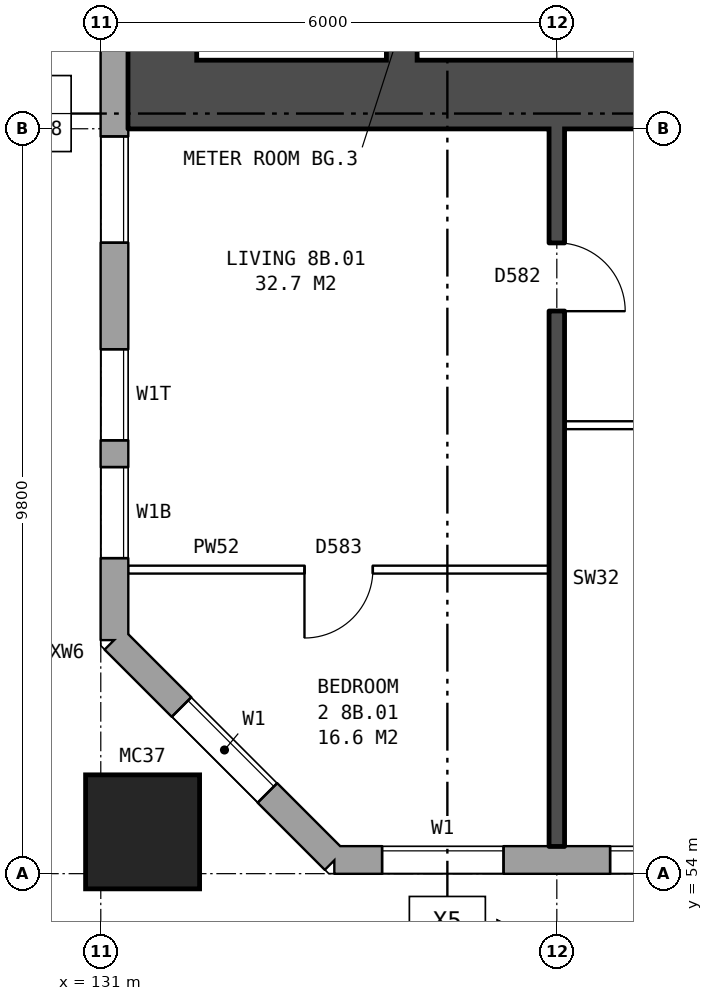
"""IFC4 building model, lengths in metres.
Left out: names, types, materials, properties, quantities, classifications, styles, units other than length and angle.
Written with IfcOpenShell. Run it as: python <this file> out.ifc"""

import sys

from ifc_helpers import new_model, si_unit, direction, frame, frame_2d, origin, origin_2d, place, context, subcontext, project, spatial, rectangle, hollow_rectangle, extrude, element, fill, save


model = new_model("IFC4")
c1 = context("Model", 3, precision=1e-05, world=origin(), true_north=direction((0.0, 1.0)))
c2 = subcontext(c1, "Body", "Model", "MODEL_VIEW")
j1 = project(units=[si_unit("LENGTHUNIT", "METRE"), si_unit("PLANEANGLEUNIT", "RADIAN")], contexts=[c1])
p1 = place(None, origin())
s1 = spatial("IfcSite", under=j1, at=p1, CompositionType="ELEMENT")
p2 = place(p1, origin())
s2 = spatial("IfcBuilding", under=s1, at=p2, CompositionType="ELEMENT")
p3 = place(p2, frame((0.0, 0.0, 31.9)))
s3 = spatial("IfcBuildingStorey", under=s2, at=p3, CompositionType="ELEMENT", Elevation=31.9)
p4 = place(p3, frame((131.55, 54.55, 0.0), z_axis=(0.0, 0.0, 1.0), x_axis=(1.0, 0.0, 0.0)))
e1 = element("IfcColumn", 1, at=p4, inside=s3, PredefinedType="COLUMN", context=c2, shape_type="SweptSolid", body=[
    extrude(hollow_rectangle(XDim=1.5, YDim=1.5, WallThickness=0.08, at=origin_2d()), origin(), (0.0, 0.0, 1.0), 3.1),
])
p5 = place(p3, frame((131.18, 57.075, 0.0), z_axis=(0.0, 0.0, 1.0), x_axis=(0.707106781187, -0.707106781187, 0.0)))
e2 = element("IfcWall", 2, at=p5, inside=s3, PredefinedType="STANDARD", context=c2, shape_type="SweptSolid", body=[
    extrude(rectangle(XDim=4.094, YDim=0.36, at=frame_2d((2.047, 0.0))), origin(), (0.0, 0.0, 1.0), 2.85),
])
p6 = place(p5, frame((1.247, 0.0, 0.8)))
e3 = element("IfcOpeningElement", 3, at=p6, cuts=e2, PredefinedType="OPENING", context=c2, shape_type="SweptSolid", body=[
    extrude(rectangle(XDim=1.6, YDim=1.8, at=frame_2d((0.8, 0.9))), frame((0.0, 0.19, 0.0), z_axis=(0.0, -1.0, 0.0), x_axis=(1.0, 0.0, 0.0)), (0.0, 0.0, 1.0), 0.38),
])
p7 = place(p3, frame((134.075, 54.18, 0.0), z_axis=(0.0, 0.0, 1.0), x_axis=(1.0, 0.0, 0.0)))
e4 = element("IfcWall", 4, at=p7, inside=s3, PredefinedType="STANDARD", context=c2, shape_type="SweptSolid", body=[
    extrude(rectangle(XDim=40.601, YDim=0.36, at=frame_2d((20.3, 0.0))), origin(), (0.0, 0.0, 1.0), 2.85),
])
p8 = place(p7, frame((0.625, 0.0, 0.8)))
e5 = element("IfcOpeningElement", 5, at=p8, cuts=e4, PredefinedType="OPENING", context=c2, shape_type="SweptSolid", body=[
    extrude(rectangle(XDim=1.6, YDim=1.8, at=frame_2d((0.8, 0.9))), frame((0.0, 0.19, 0.0), z_axis=(0.0, -1.0, 0.0), x_axis=(1.0, 0.0, 0.0)), (0.0, 0.0, 1.0), 0.38),
])
p9 = place(p7, frame((3.625, 0.0, 0.8)))
e6 = element("IfcOpeningElement", 6, at=p9, cuts=e4, PredefinedType="OPENING", context=c2, shape_type="SweptSolid", body=[
    extrude(rectangle(XDim=1.6, YDim=1.8, at=frame_2d((0.8, 0.9))), frame((0.0, 0.19, 0.0), z_axis=(0.0, -1.0, 0.0), x_axis=(1.0, 0.0, 0.0)), (0.0, 0.0, 1.0), 0.38),
])
p10 = place(p7, frame((6.625, 0.0, 0.8)))
e7 = element("IfcOpeningElement", 7, at=p10, cuts=e4, PredefinedType="OPENING", context=c2, shape_type="SweptSolid", body=[
    extrude(rectangle(XDim=1.6, YDim=1.8, at=frame_2d((0.8, 0.9))), frame((0.0, 0.19, 0.0), z_axis=(0.0, -1.0, 0.0), x_axis=(1.0, 0.0, 0.0)), (0.0, 0.0, 1.0), 0.38),
])
p11 = place(p7, frame((9.625, 0.0, 0.8)))
e8 = element("IfcOpeningElement", 8, at=p11, cuts=e4, PredefinedType="OPENING", context=c2, shape_type="SweptSolid", body=[
    extrude(rectangle(XDim=1.6, YDim=1.8, at=frame_2d((0.8, 0.9))), frame((0.0, 0.19, 0.0), z_axis=(0.0, -1.0, 0.0), x_axis=(1.0, 0.0, 0.0)), (0.0, 0.0, 1.0), 0.38),
])
p12 = place(p7, frame((12.075, 0.0, 0.8)))
e9 = element("IfcOpeningElement", 9, at=p12, cuts=e4, PredefinedType="OPENING", context=c2, shape_type="SweptSolid", body=[
    extrude(rectangle(XDim=1.2, YDim=1.8, at=frame_2d((0.6, 0.9))), frame((0.0, 0.19, 0.0), z_axis=(0.0, -1.0, 0.0), x_axis=(1.0, 0.0, 0.0)), (0.0, 0.0, 1.0), 0.38),
])
p13 = place(p7, frame((15.575, 0.0, 0.65)))
e10 = element("IfcOpeningElement", 10, at=p13, cuts=e4, PredefinedType="OPENING", context=c2, shape_type="SweptSolid", body=[
    extrude(rectangle(XDim=0.8, YDim=0.9, at=frame_2d((0.4, 0.45))), frame((0.0, 0.19, 0.0), z_axis=(0.0, -1.0, 0.0), x_axis=(1.0, 0.0, 0.0)), (0.0, 0.0, 1.0), 0.38),
])
p14 = place(p7, frame((18.625, 0.0, 0.8)))
e11 = element("IfcOpeningElement", 11, at=p14, cuts=e4, PredefinedType="OPENING", context=c2, shape_type="SweptSolid", body=[
    extrude(rectangle(XDim=1.6, YDim=1.8, at=frame_2d((0.8, 0.9))), frame((0.0, 0.19, 0.0), z_axis=(0.0, -1.0, 0.0), x_axis=(1.0, 0.0, 0.0)), (0.0, 0.0, 1.0), 0.38),
])
p15 = place(p7, frame((21.625, 0.0, 0.8)))
e12 = element("IfcOpeningElement", 12, at=p15, cuts=e4, PredefinedType="OPENING", context=c2, shape_type="SweptSolid", body=[
    extrude(rectangle(XDim=1.6, YDim=1.8, at=frame_2d((0.8, 0.9))), frame((0.0, 0.19, 0.0), z_axis=(0.0, -1.0, 0.0), x_axis=(1.0, 0.0, 0.0)), (0.0, 0.0, 1.0), 0.38),
])
p16 = place(p7, frame((23.525, 0.0, 0.8)))
e13 = element("IfcOpeningElement", 13, at=p16, cuts=e4, PredefinedType="OPENING", context=c2, shape_type="SweptSolid", body=[
    extrude(rectangle(XDim=1.2, YDim=0.9, at=frame_2d((0.6, 0.45))), frame((0.0, 0.19, 0.0), z_axis=(0.0, -1.0, 0.0), x_axis=(1.0, 0.0, 0.0)), (0.0, 0.0, 1.0), 0.38),
])
p17 = place(p7, frame((27.625, 0.0, 0.8)))
e14 = element("IfcOpeningElement", 14, at=p17, cuts=e4, PredefinedType="OPENING", context=c2, shape_type="SweptSolid", body=[
    extrude(rectangle(XDim=1.6, YDim=1.8, at=frame_2d((0.8, 0.9))), frame((0.0, 0.19, 0.0), z_axis=(0.0, -1.0, 0.0), x_axis=(1.0, 0.0, 0.0)), (0.0, 0.0, 1.0), 0.38),
])
p18 = place(p7, frame((30.625, 0.0, 0.8)))
e15 = element("IfcOpeningElement", 15, at=p18, cuts=e4, PredefinedType="OPENING", context=c2, shape_type="SweptSolid", body=[
    extrude(rectangle(XDim=1.6, YDim=1.8, at=frame_2d((0.8, 0.9))), frame((0.0, 0.19, 0.0), z_axis=(0.0, -1.0, 0.0), x_axis=(1.0, 0.0, 0.0)), (0.0, 0.0, 1.0), 0.38),
])
p19 = place(p7, frame((33.625, 0.0, 0.8)))
e16 = element("IfcOpeningElement", 16, at=p19, cuts=e4, PredefinedType="OPENING", context=c2, shape_type="SweptSolid", body=[
    extrude(rectangle(XDim=1.6, YDim=1.8, at=frame_2d((0.8, 0.9))), frame((0.0, 0.19, 0.0), z_axis=(0.0, -1.0, 0.0), x_axis=(1.0, 0.0, 0.0)), (0.0, 0.0, 1.0), 0.38),
])
p20 = place(p7, frame((36.625, 0.0, 0.8)))
e17 = element("IfcOpeningElement", 17, at=p20, cuts=e4, PredefinedType="OPENING", context=c2, shape_type="SweptSolid", body=[
    extrude(rectangle(XDim=1.6, YDim=1.8, at=frame_2d((0.8, 0.9))), frame((0.0, 0.19, 0.0), z_axis=(0.0, -1.0, 0.0), x_axis=(1.0, 0.0, 0.0)), (0.0, 0.0, 1.0), 0.38),
])
p21 = place(p7, frame((13.575, 0.0, 1.4)))
e18 = element("IfcOpeningElement", 18, at=p21, cuts=e4, PredefinedType="OPENING", context=c2, shape_type="SweptSolid", body=[
    extrude(rectangle(XDim=0.6, YDim=1.2, at=frame_2d((0.3, 0.6))), frame((0.0, 0.19, 0.0), z_axis=(0.0, -1.0, 0.0), x_axis=(1.0, 0.0, 0.0)), (0.0, 0.0, 1.0), 0.38),
])
p22 = place(p7, frame((16.725, 0.0, 0.65)))
e19 = element("IfcOpeningElement", 19, at=p22, cuts=e4, PredefinedType="OPENING", context=c2, shape_type="SweptSolid", body=[
    extrude(rectangle(XDim=1.0, YDim=1.8, at=frame_2d((0.5, 0.9))), frame((0.0, 0.19, 0.0), z_axis=(0.0, -1.0, 0.0), x_axis=(1.0, 0.0, 0.0)), (0.0, 0.0, 1.0), 0.38),
])
p23 = place(p7, frame((26.075, 0.0, 1.7)))
e20 = element("IfcOpeningElement", 20, at=p23, cuts=e4, PredefinedType="OPENING", context=c2, shape_type="SweptSolid", body=[
    extrude(rectangle(XDim=0.6, YDim=0.9, at=frame_2d((0.3, 0.45))), frame((0.0, 0.19, 0.0), z_axis=(0.0, -1.0, 0.0), x_axis=(1.0, 0.0, 0.0)), (0.0, 0.0, 1.0), 0.38),
])
p24 = place(p3, frame((131.18, 82.925, 0.0), z_axis=(0.0, 0.0, 1.0), x_axis=(0.0, -1.0, 0.0)))
e21 = element("IfcWall", 21, at=p24, inside=s3, PredefinedType="STANDARD", context=c2, shape_type="SweptSolid", body=[
    extrude(rectangle(XDim=25.851, YDim=0.36, at=frame_2d((12.925, 0.0))), origin(), (0.0, 0.0, 1.0), 2.85),
])
p25 = place(p24, frame((0.3, 0.0, 0.8)))
e22 = element("IfcOpeningElement", 22, at=p25, cuts=e21, PredefinedType="OPENING", context=c2, shape_type="SweptSolid", body=[
    extrude(rectangle(XDim=1.4, YDim=1.8, at=frame_2d((0.7, 0.9))), frame((0.0, 0.19, 0.0), z_axis=(0.0, -1.0, 0.0), x_axis=(1.0, 0.0, 0.0)), (0.0, 0.0, 1.0), 0.38),
])
p26 = place(p24, frame((4.075, 0.0, 0.25)))
e23 = element("IfcOpeningElement", 23, at=p26, cuts=e21, PredefinedType="OPENING", context=c2, shape_type="SweptSolid", body=[
    extrude(rectangle(XDim=0.6, YDim=0.9, at=frame_2d((0.3, 0.45))), frame((0.0, 0.19, 0.0), z_axis=(0.0, -1.0, 0.0), x_axis=(1.0, 0.0, 0.0)), (0.0, 0.0, 1.0), 0.38),
])
p27 = place(p24, frame((19.225, 0.0, 1.6)))
e24 = element("IfcOpeningElement", 24, at=p27, cuts=e21, PredefinedType="OPENING", context=c2, shape_type="SweptSolid", body=[
    extrude(rectangle(XDim=1.4, YDim=0.9, at=frame_2d((0.7, 0.45))), frame((0.0, 0.19, 0.0), z_axis=(0.0, -1.0, 0.0), x_axis=(1.0, 0.0, 0.0)), (0.0, 0.0, 1.0), 0.38),
])
p28 = place(p24, frame((22.025, 0.0, 0.8)))
e25 = element("IfcOpeningElement", 25, at=p28, cuts=e21, PredefinedType="OPENING", context=c2, shape_type="SweptSolid", body=[
    extrude(rectangle(XDim=1.2, YDim=0.9, at=frame_2d((0.6, 0.45))), frame((0.0, 0.19, 0.0), z_axis=(0.0, -1.0, 0.0), x_axis=(1.0, 0.0, 0.0)), (0.0, 0.0, 1.0), 0.38),
])
p29 = place(p24, frame((2.0, 0.0, 0.8)))
e26 = element("IfcOpeningElement", 26, at=p29, cuts=e21, PredefinedType="OPENING", context=c2, shape_type="SweptSolid", body=[
    extrude(rectangle(XDim=0.8, YDim=1.5, at=frame_2d((0.4, 0.75))), frame((0.0, 0.19, 0.0), z_axis=(0.0, -1.0, 0.0), x_axis=(1.0, 0.0, 0.0)), (0.0, 0.0, 1.0), 0.38),
])
p30 = place(p24, frame((5.125, 0.0, 1.65)))
e27 = element("IfcOpeningElement", 27, at=p30, cuts=e21, PredefinedType="OPENING", context=c2, shape_type="SweptSolid", body=[
    extrude(rectangle(XDim=1.4, YDim=0.9, at=frame_2d((0.7, 0.45))), frame((0.0, 0.19, 0.0), z_axis=(0.0, -1.0, 0.0), x_axis=(1.0, 0.0, 0.0)), (0.0, 0.0, 1.0), 0.38),
])
p31 = place(p24, frame((23.575, 0.0, 0.8)))
e28 = element("IfcOpeningElement", 28, at=p31, cuts=e21, PredefinedType="OPENING", context=c2, shape_type="SweptSolid", body=[
    extrude(rectangle(XDim=1.2, YDim=1.8, at=frame_2d((0.6, 0.9))), frame((0.0, 0.19, 0.0), z_axis=(0.0, -1.0, 0.0), x_axis=(1.0, 0.0, 0.0)), (0.0, 0.0, 1.0), 0.38),
])
p32 = place(p3, frame((131.81, 64.7, 0.0), z_axis=(0.0, 0.0, 1.0), x_axis=(0.0, 1.0, 0.0)))
e29 = element("IfcWall", 29, at=p32, inside=s3, PredefinedType="SHEAR", context=c2, shape_type="SweptSolid", body=[
    extrude(rectangle(XDim=10.6, YDim=0.9, at=frame_2d((5.3, 0.0))), origin(), (0.0, 0.0, 1.0), 2.85),
])
p33 = place(p3, frame((139.76, 64.25, 0.0), z_axis=(0.0, 0.0, 1.0), x_axis=(-1.0, 0.0, 0.0)))
e30 = element("IfcWall", 30, at=p33, inside=s3, PredefinedType="SHEAR", context=c2, shape_type="SweptSolid", body=[
    extrude(rectangle(XDim=8.4, YDim=0.9, at=frame_2d((4.2, 0.0))), origin(), (0.0, 0.0, 1.0), 2.85),
])
p34 = place(p3, frame((134.96, 64.7, 0.0), z_axis=(0.0, 0.0, 1.0), x_axis=(0.0, 1.0, 0.0)))
e31 = element("IfcWall", 31, at=p34, inside=s3, PredefinedType="SHEAR", context=c2, shape_type="SweptSolid", body=[
    extrude(rectangle(XDim=6.35, YDim=0.4, at=frame_2d((3.175, 0.0))), origin(), (0.0, 0.0, 1.0), 2.85),
])
p35 = place(p3, frame((131.36, 58.0, 0.0), z_axis=(0.0, 0.0, 1.0), x_axis=(1.0, 0.0, 0.0)))
e32 = element("IfcWall", 32, at=p35, inside=s3, PredefinedType="PARTITIONING", context=c2, shape_type="SweptSolid", body=[
    extrude(rectangle(XDim=5.54, YDim=0.1, at=frame_2d((2.77, 0.0))), origin(), (0.0, 0.0, 1.0), 2.85),
])
p36 = place(p35, frame((2.32, 0.0, 0.0)))
e33 = element("IfcOpeningElement", 33, at=p36, cuts=e32, PredefinedType="OPENING", context=c2, shape_type="SweptSolid", body=[
    extrude(rectangle(XDim=0.9, YDim=2.1, at=frame_2d((0.45, 1.05))), frame((0.0, 0.06, 0.0), z_axis=(0.0, -1.0, 0.0), x_axis=(1.0, 0.0, 0.0)), (0.0, 0.0, 1.0), 0.12),
])
p37 = place(p3, frame((137.1, 59.9, 0.0), z_axis=(0.0, 0.0, 1.0), x_axis=(1.0, 0.0, 0.0)))
e34 = element("IfcWall", 34, at=p37, inside=s3, PredefinedType="PARTITIONING", context=c2, shape_type="SweptSolid", body=[
    extrude(rectangle(XDim=5.8, YDim=0.1, at=frame_2d((2.9, 0.0))), origin(), (0.0, 0.0, 1.0), 2.85),
])
p38 = place(p37, frame((1.3, 0.0, 0.0)))
e35 = element("IfcOpeningElement", 35, at=p38, cuts=e34, PredefinedType="OPENING", context=c2, shape_type="SweptSolid", body=[
    extrude(rectangle(XDim=0.9, YDim=2.1, at=frame_2d((0.45, 1.05))), frame((0.0, 0.06, 0.0), z_axis=(0.0, -1.0, 0.0), x_axis=(1.0, 0.0, 0.0)), (0.0, 0.0, 1.0), 0.12),
])
p39 = place(p37, frame((4.2, 0.0, 0.0)))
e36 = element("IfcOpeningElement", 36, at=p39, cuts=e34, PredefinedType="OPENING", context=c2, shape_type="SweptSolid", body=[
    extrude(rectangle(XDim=0.9, YDim=2.1, at=frame_2d((0.45, 1.05))), frame((0.0, 0.06, 0.0), z_axis=(0.0, -1.0, 0.0), x_axis=(1.0, 0.0, 0.0)), (0.0, 0.0, 1.0), 0.12),
])
p40 = place(p3, frame((137.0, 54.36, 0.0), z_axis=(0.0, 0.0, 1.0), x_axis=(0.0, 1.0, 0.0)))
e37 = element("IfcWall", 37, at=p40, inside=s3, PredefinedType="SOLIDWALL", context=c2, shape_type="SweptSolid", body=[
    extrude(rectangle(XDim=9.44, YDim=0.2, at=frame_2d((4.72, 0.0))), origin(), (0.0, 0.0, 1.0), 2.85),
])
p41 = place(p40, frame((7.04, 0.0, 0.0)))
e38 = element("IfcOpeningElement", 38, at=p41, cuts=e37, PredefinedType="OPENING", context=c2, shape_type="SweptSolid", body=[
    extrude(rectangle(XDim=0.9, YDim=2.1, at=frame_2d((0.45, 1.05))), frame((0.0, 0.11, 0.0), z_axis=(0.0, -1.0, 0.0), x_axis=(1.0, 0.0, 0.0)), (0.0, 0.0, 1.0), 0.22),
])
p42 = place(p6, origin())
e39 = element("IfcWindow", 39, at=p42, inside=s3, PartitioningType="SINGLE_PANEL", PredefinedType="WINDOW", context=c2, shape_type="SweptSolid", body=[
    extrude(rectangle(XDim=1.6, YDim=1.8, at=frame_2d((0.8, 0.9))), frame((0.0, 0.15, 0.0), z_axis=(0.0, -1.0, 0.0), x_axis=(1.0, 0.0, 0.0)), (0.0, 0.0, 1.0), 0.06),
])
fill(e3, e39)
p43 = place(p8, origin())
e40 = element("IfcWindow", 40, at=p43, inside=s3, PartitioningType="SINGLE_PANEL", PredefinedType="WINDOW", context=c2, shape_type="SweptSolid", body=[
    extrude(rectangle(XDim=1.6, YDim=1.8, at=frame_2d((0.8, 0.9))), frame((0.0, 0.15, 0.0), z_axis=(0.0, -1.0, 0.0), x_axis=(1.0, 0.0, 0.0)), (0.0, 0.0, 1.0), 0.06),
])
fill(e5, e40)
p44 = place(p9, origin())
e41 = element("IfcWindow", 41, at=p44, inside=s3, PartitioningType="SINGLE_PANEL", PredefinedType="WINDOW", context=c2, shape_type="SweptSolid", body=[
    extrude(rectangle(XDim=1.6, YDim=1.8, at=frame_2d((0.8, 0.9))), frame((0.0, 0.15, 0.0), z_axis=(0.0, -1.0, 0.0), x_axis=(1.0, 0.0, 0.0)), (0.0, 0.0, 1.0), 0.06),
])
fill(e6, e41)
p45 = place(p27, origin())
e42 = element("IfcWindow", 42, at=p45, inside=s3, PartitioningType="SINGLE_PANEL", PredefinedType="WINDOW", context=c2, shape_type="SweptSolid", body=[
    extrude(rectangle(XDim=1.4, YDim=0.9, at=frame_2d((0.7, 0.45))), frame((0.0, 0.15, 0.0), z_axis=(0.0, -1.0, 0.0), x_axis=(1.0, 0.0, 0.0)), (0.0, 0.0, 1.0), 0.06),
])
fill(e24, e42)
p46 = place(p28, origin())
e43 = element("IfcWindow", 43, at=p46, inside=s3, PartitioningType="SINGLE_PANEL", PredefinedType="WINDOW", context=c2, shape_type="SweptSolid", body=[
    extrude(rectangle(XDim=1.2, YDim=0.9, at=frame_2d((0.6, 0.45))), frame((0.0, 0.15, 0.0), z_axis=(0.0, -1.0, 0.0), x_axis=(1.0, 0.0, 0.0)), (0.0, 0.0, 1.0), 0.06),
])
fill(e25, e43)
p47 = place(p36, frame((0.9, 0.0, 0.0), z_axis=(0.0, 0.0, 1.0), x_axis=(-1.0, 0.0, 0.0)))
e44 = element("IfcDoor", 44, at=p47, inside=s3, OperationType="SINGLE_SWING_RIGHT", PredefinedType="DOOR", context=c2, shape_type="SweptSolid", body=[
    extrude(rectangle(XDim=0.9, YDim=2.1, at=frame_2d((0.45, 1.05))), frame((0.0, 0.025, 0.0), z_axis=(0.0, -1.0, 0.0), x_axis=(1.0, 0.0, 0.0)), (0.0, 0.0, 1.0), 0.05),
])
fill(e33, e44)
p48 = place(p41, frame((0.9, 0.0, 0.0), z_axis=(0.0, 0.0, 1.0), x_axis=(-1.0, 0.0, 0.0)))
e45 = element("IfcDoor", 45, at=p48, inside=s3, OperationType="SINGLE_SWING_RIGHT", PredefinedType="DOOR", context=c2, shape_type="SweptSolid", body=[
    extrude(rectangle(XDim=0.9, YDim=2.1, at=frame_2d((0.45, 1.05))), frame((0.0, 0.025, 0.0), z_axis=(0.0, -1.0, 0.0), x_axis=(1.0, 0.0, 0.0)), (0.0, 0.0, 1.0), 0.05),
])
fill(e38, e45)
p49 = place(p31, origin())
e46 = element("IfcWindow", 46, at=p49, inside=s3, PartitioningType="SINGLE_PANEL", PredefinedType="WINDOW", context=c2, shape_type="SweptSolid", body=[
    extrude(rectangle(XDim=1.2, YDim=1.8, at=frame_2d((0.6, 0.9))), frame((0.0, 0.15, 0.0), z_axis=(0.0, -1.0, 0.0), x_axis=(1.0, 0.0, 0.0)), (0.0, 0.0, 1.0), 0.06),
])
fill(e28, e46)
save(model, sys.argv[1])
